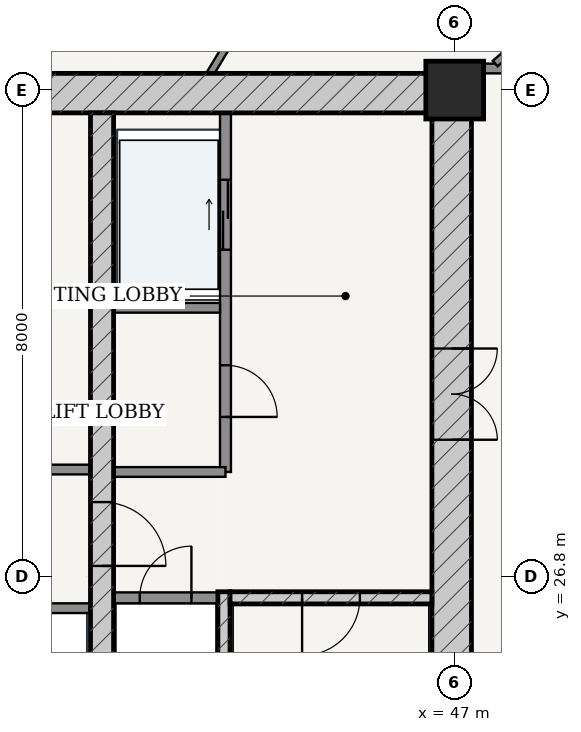
"""IFC4 building model, lengths in metres.
Left out: names, types, materials, properties, quantities, classifications, styles, units other than length and angle.
Written with IfcOpenShell. Run it as: python <this file> out.ifc"""

import sys

from ifc_helpers import new_model, si_unit, direction, frame, frame_2d, origin, origin_2d, place, context, subcontext, project, spatial, rectangle, extrude, source, transform, mapped, element, fill, save


model = new_model("IFC4")
c1 = context("Model", 3, precision=1e-05, world=origin(), true_north=direction((-0.2419218956, 0.970295726276)))
c2 = subcontext(c1, "Body", "Model", "MODEL_VIEW")
j1 = project(units=[si_unit("LENGTHUNIT", "METRE"), si_unit("PLANEANGLEUNIT", "RADIAN")], contexts=[c1])
p1 = place(None, origin())
s1 = spatial("IfcSite", under=j1, at=p1, CompositionType="ELEMENT")
p2 = place(p1, origin())
s2 = spatial("IfcBuilding", under=s1, at=p2, CompositionType="ELEMENT")
p3 = place(p2, frame((0.0, 0.0, 160.6)))
s3 = spatial("IfcBuildingStorey", under=s2, at=p3, CompositionType="ELEMENT", Elevation=160.6)
p4 = place(p3, frame((47.0, 34.8, 0.0), z_axis=(0.0, 0.0, 1.0), x_axis=(1.0, 0.0, 0.0)))
e1 = element("IfcColumn", 1, at=p4, inside=s3, PredefinedType="COLUMN", context=c2, shape_type="SweptSolid", body=[
    extrude(rectangle(XDim=0.95, YDim=0.95, at=origin_2d()), origin(), (0.0, 0.0, 1.0), 3.6),
])
p5 = place(p3, frame((28.725, 34.75, 0.0), z_axis=(0.0, 0.0, 1.0), x_axis=(1.0, 0.0, 0.0)))
e2 = element("IfcWall", 2, at=p5, inside=s3, PredefinedType="SHEAR", context=c2, shape_type="SweptSolid", body=[
    extrude(rectangle(XDim=18.55, YDim=0.65, at=frame_2d((9.275, 0.0))), origin(), (0.0, 0.0, 1.0), 3.33),
])
p6 = place(p3, frame((46.95, 19.175, 0.0), z_axis=(0.0, 0.0, 1.0), x_axis=(0.0, 1.0, 0.0)))
e3 = element("IfcWall", 3, at=p6, inside=s3, PredefinedType="SHEAR", context=c2, shape_type="SweptSolid", body=[
    extrude(rectangle(XDim=15.25, YDim=0.65, at=frame_2d((7.625, 0.0))), origin(), (0.0, 0.0, 1.0), 3.33),
])
p7 = place(p6, frame((9.875, 0.0, 0.0)))
e4 = element("IfcOpeningElement", 4, at=p7, cuts=e3, PredefinedType="OPENING", context=c2, shape_type="SweptSolid", body=[
    extrude(rectangle(XDim=1.5, YDim=2.2, at=frame_2d((0.75, 1.1))), frame((0.0, 0.335, 0.0), z_axis=(0.0, -1.0, 0.0), x_axis=(1.0, 0.0, 0.0)), (0.0, 0.0, 1.0), 0.67),
])
p8 = place(p3, frame((43.205, 19.175, 0.0), z_axis=(0.0, 0.0, 1.0), x_axis=(0.0, 1.0, 0.0)))
e5 = element("IfcWall", 5, at=p8, inside=s3, PredefinedType="SOLIDWALL", context=c2, shape_type="SweptSolid", body=[
    extrude(rectangle(XDim=7.375, YDim=0.2, at=frame_2d((3.688, 0.0))), origin(), (0.0, 0.0, 1.0), 3.33),
])
p9 = place(p3, frame((43.305, 26.45, 0.0), z_axis=(0.0, 0.0, 1.0), x_axis=(1.0, 0.0, 0.0)))
e6 = element("IfcWall", 6, at=p9, inside=s3, PredefinedType="SOLIDWALL", context=c2, shape_type="SweptSolid", body=[
    extrude(rectangle(XDim=3.32, YDim=0.2, at=frame_2d((1.66, 0.0))), origin(), (0.0, 0.0, 1.0), 3.33),
])
p10 = place(p9, frame((1.185, 0.0, 0.0)))
e7 = element("IfcOpeningElement", 7, at=p10, cuts=e6, PredefinedType="OPENING", context=c2, shape_type="SweptSolid", body=[
    extrude(rectangle(XDim=0.95, YDim=2.15, at=frame_2d((0.475, 1.075))), frame((0.0, 0.11, 0.0), z_axis=(0.0, -1.0, 0.0), x_axis=(1.0, 0.0, 0.0)), (0.0, 0.0, 1.0), 0.22),
])
p11 = place(p3, frame((41.2, 19.175, 0.0), z_axis=(0.0, 0.0, 1.0), x_axis=(0.0, 1.0, 0.0)))
e8 = element("IfcWall", 8, at=p11, inside=s3, PredefinedType="SHEAR", context=c2, shape_type="SweptSolid", body=[
    extrude(rectangle(XDim=15.25, YDim=0.38, at=frame_2d((7.625, 0.0))), origin(), (0.0, 0.0, 1.0), 3.33),
])
p12 = place(p11, frame((7.8, 0.0, 0.0)))
e9 = element("IfcOpeningElement", 9, at=p12, cuts=e8, PredefinedType="OPENING", context=c2, shape_type="SweptSolid", body=[
    extrude(rectangle(XDim=1.05, YDim=2.15, at=frame_2d((0.525, 1.075))), frame((0.0, 0.2, 0.0), z_axis=(0.0, -1.0, 0.0), x_axis=(1.0, 0.0, 0.0)), (0.0, 0.0, 1.0), 0.4),
])
p13 = place(p3, frame((41.39, 26.45, 0.0), z_axis=(0.0, 0.0, 1.0), x_axis=(1.0, 0.0, 0.0)))
e10 = element("IfcWall", 10, at=p13, inside=s3, PredefinedType="PARTITIONING", context=c2, shape_type="SweptSolid", body=[
    extrude(rectangle(XDim=1.71, YDim=0.18, at=frame_2d((0.855, 0.0))), origin(), (0.0, 0.0, 1.0), 3.33),
])
p14 = place(p13, frame((0.43, 0.0, 0.0)))
e11 = element("IfcOpeningElement", 11, at=p14, cuts=e10, PredefinedType="OPENING", context=c2, shape_type="SweptSolid", body=[
    extrude(rectangle(XDim=0.85, YDim=2.1, at=frame_2d((0.425, 1.05))), frame((0.0, 0.1, 0.0), z_axis=(0.0, -1.0, 0.0), x_axis=(1.0, 0.0, 0.0)), (0.0, 0.0, 1.0), 0.2),
])
p15 = place(p3, frame((43.23, 28.52, 0.0), z_axis=(0.0, 0.0, 1.0), x_axis=(0.0, 1.0, 0.0)))
e12 = element("IfcWall", 12, at=p15, inside=s3, PredefinedType="PARTITIONING", context=c2, shape_type="SweptSolid", body=[
    extrude(rectangle(XDim=5.905, YDim=0.18, at=frame_2d((2.953, 0.0))), origin(), (0.0, 0.0, 1.0), 3.33),
])
p16 = place(p15, frame((0.905, 0.0, 0.0)))
e13 = element("IfcOpeningElement", 13, at=p16, cuts=e12, PredefinedType="OPENING", context=c2, shape_type="SweptSolid", body=[
    extrude(rectangle(XDim=0.85, YDim=2.1, at=frame_2d((0.425, 1.05))), frame((0.0, 0.1, 0.0), z_axis=(0.0, -1.0, 0.0), x_axis=(1.0, 0.0, 0.0)), (0.0, 0.0, 1.0), 0.2),
])
p17 = place(p15, frame((3.655, 0.0, 0.0)))
e14 = element("IfcOpeningElement", 14, at=p17, cuts=e12, PredefinedType="OPENING", context=c2, shape_type="SweptSolid", body=[
    extrude(rectangle(XDim=1.15, YDim=2.2, at=frame_2d((0.575, 1.1))), frame((0.0, 0.1, 0.0), z_axis=(0.0, -1.0, 0.0), x_axis=(1.0, 0.0, 0.0)), (0.0, 0.0, 1.0), 0.2),
])
p18 = place(p3, frame((41.39, 31.22, 0.0), z_axis=(0.0, 0.0, 1.0), x_axis=(1.0, 0.0, 0.0)))
e15 = element("IfcWall", 15, at=p18, inside=s3, PredefinedType="PARTITIONING", context=c2, shape_type="SweptSolid", body=[
    extrude(rectangle(XDim=1.75, YDim=0.16, at=frame_2d((0.875, 0.0))), origin(), (0.0, 0.0, 1.0), 3.33),
])
p19 = place(p3, frame((41.39, 28.52, 0.0), z_axis=(0.0, 0.0, 1.0), x_axis=(1.0, 0.0, 0.0)))
e16 = element("IfcWall", 16, at=p19, inside=s3, PredefinedType="PARTITIONING", context=c2, shape_type="SweptSolid", body=[
    extrude(rectangle(XDim=1.84, YDim=0.16, at=frame_2d((0.92, 0.0))), origin(), (0.0, 0.0, 1.0), 3.33),
])
p20 = place(p3, frame((34.99, 28.56, 0.0), z_axis=(0.0, 0.0, 1.0), x_axis=(1.0, 0.0, 0.0)))
e17 = element("IfcWall", 17, at=p20, inside=s3, PredefinedType="PARTITIONING", context=c2, shape_type="SweptSolid", body=[
    extrude(rectangle(XDim=6.02, YDim=0.16, at=frame_2d((3.01, 0.0))), origin(), (0.0, 0.0, 1.0), 3.33),
])
p21 = place(p20, frame((2.585, 0.0, 0.0)))
e18 = element("IfcOpeningElement", 18, at=p21, cuts=e17, PredefinedType="OPENING", context=c2, shape_type="SweptSolid", body=[
    extrude(rectangle(XDim=0.85, YDim=2.1, at=frame_2d((0.425, 1.05))), frame((0.0, 0.09, 0.0), z_axis=(0.0, -1.0, 0.0), x_axis=(1.0, 0.0, 0.0)), (0.0, 0.0, 1.0), 0.18),
])
p22 = place(p3, frame((34.99, 26.28, 0.0), z_axis=(0.0, 0.0, 1.0), x_axis=(1.0, 0.0, 0.0)))
e19 = element("IfcWall", 19, at=p22, inside=s3, PredefinedType="PARTITIONING", context=c2, shape_type="SweptSolid", body=[
    extrude(rectangle(XDim=6.02, YDim=0.16, at=frame_2d((3.01, 0.0))), origin(), (0.0, 0.0, 1.0), 3.33),
])
p23 = place(p22, frame((0.225, 0.0, 0.0)))
e20 = element("IfcOpeningElement", 20, at=p23, cuts=e19, PredefinedType="OPENING", context=c2, shape_type="SweptSolid", body=[
    extrude(rectangle(XDim=1.1, YDim=2.2, at=frame_2d((0.55, 1.1))), frame((0.0, 0.09, 0.0), z_axis=(0.0, -1.0, 0.0), x_axis=(1.0, 0.0, 0.0)), (0.0, 0.0, 1.0), 0.18),
])
p24 = place(p22, frame((1.705, 0.0, 0.0)))
e21 = element("IfcOpeningElement", 21, at=p24, cuts=e19, PredefinedType="OPENING", context=c2, shape_type="SweptSolid", body=[
    extrude(rectangle(XDim=1.1, YDim=2.2, at=frame_2d((0.55, 1.1))), frame((0.0, 0.09, 0.0), z_axis=(0.0, -1.0, 0.0), x_axis=(1.0, 0.0, 0.0)), (0.0, 0.0, 1.0), 0.18),
])
p25 = place(p3, frame((47.275, 35.155, 0.0), z_axis=(0.0, 0.0, 1.0), x_axis=(1.0, 0.0, 0.0)))
e22 = element("IfcWall", 22, at=p25, inside=s3, PredefinedType="PARTITIONING", context=c2, shape_type="SweptSolid", body=[
    extrude(rectangle(XDim=1.93, YDim=0.16, at=frame_2d((0.965, 0.0))), origin(), (0.0, 0.0, 1.0), 2.776),
])
p26 = place(p3, frame((47.665, 35.236, 0.0), z_axis=(0.0, 0.0, 1.0), x_axis=(0.753384754287, 0.657579966246, 0.0)))
e23 = element("IfcWall", 23, at=p26, inside=s3, PredefinedType="PARTITIONING", context=c2, shape_type="SweptSolid", body=[
    extrude(rectangle(XDim=4.133, YDim=0.12, at=frame_2d((2.067, 0.0))), origin(), (0.0, 0.0, 1.0), 3.005),
])
p27 = place(p26, frame((1.617, 0.0, 0.0)))
e24 = element("IfcOpeningElement", 24, at=p27, cuts=e23, PredefinedType="OPENING", context=c2, shape_type="SweptSolid", body=[
    extrude(rectangle(XDim=0.9, YDim=2.15, at=frame_2d((0.45, 1.075))), frame((0.0, 0.07, 0.0), z_axis=(0.0, -1.0, 0.0), x_axis=(1.0, 0.0, 0.0)), (0.0, 0.0, 1.0), 0.14),
])
p28 = place(p3, frame((42.98, 35.075, 0.0), z_axis=(0.0, 0.0, 1.0), x_axis=(0.515686235332, 0.856777512946, 0.0)))
e25 = element("IfcWall", 25, at=p28, inside=s3, PredefinedType="PARTITIONING", context=c2, shape_type="SweptSolid", body=[
    extrude(rectangle(XDim=3.346, YDim=0.12, at=frame_2d((1.673, 0.0))), origin(), (0.0, 0.0, 1.0), 3.33),
])
m1 = source(origin(), c2, "Body", "SweptSolid", [
    extrude(rectangle(XDim=1.5, YDim=2.2, at=frame_2d((0.75, 1.1))), frame((0.0, 0.025, 0.0), z_axis=(0.0, -1.0, 0.0), x_axis=(1.0, 0.0, 0.0)), (0.0, 0.0, 1.0), 0.05),
])
p29 = place(p7, frame((1.5, 0.0, 0.0), z_axis=(0.0, 0.0, 1.0), x_axis=(-1.0, 0.0, 0.0)))
e26 = element("IfcDoor", 26, at=p29, inside=s3, OperationType="DOUBLE_DOOR_SINGLE_SWING", PredefinedType="DOOR", context=c2, shape_type="MappedRepresentation", body=[
    mapped(m1, transform((0.0, 0.0, 0.0), scale=1.0)),
])
fill(e4, e26)
m2 = source(origin(), c2, "Body", "SweptSolid", [
    extrude(rectangle(XDim=1.05, YDim=2.15, at=frame_2d((0.525, 1.075))), frame((0.0, 0.025, 0.0), z_axis=(0.0, -1.0, 0.0), x_axis=(1.0, 0.0, 0.0)), (0.0, 0.0, 1.0), 0.05),
])
p30 = place(p12, frame((1.05, 0.0, 0.0), z_axis=(0.0, 0.0, 1.0), x_axis=(-1.0, 0.0, 0.0)))
e27 = element("IfcDoor", 27, at=p30, inside=s3, OperationType="SINGLE_SWING_RIGHT", PredefinedType="DOOR", context=c2, shape_type="MappedRepresentation", body=[
    mapped(m2, transform((0.0, 0.0, 0.0), scale=1.0)),
])
fill(e9, e27)
m3 = source(origin(), c2, "Body", "SweptSolid", [
    extrude(rectangle(XDim=0.95, YDim=2.15, at=frame_2d((0.475, 1.075))), frame((0.0, 0.025, 0.0), z_axis=(0.0, -1.0, 0.0), x_axis=(1.0, 0.0, 0.0)), (0.0, 0.0, 1.0), 0.05),
])
p31 = place(p10, frame((0.95, 0.0, 0.0), z_axis=(0.0, 0.0, 1.0), x_axis=(-1.0, 0.0, 0.0)))
e28 = element("IfcDoor", 28, at=p31, inside=s3, OperationType="SINGLE_SWING_RIGHT", PredefinedType="DOOR", context=c2, shape_type="MappedRepresentation", body=[
    mapped(m3, transform((0.0, 0.0, 0.0), scale=1.0)),
])
fill(e7, e28)
m4 = source(origin(), c2, "Body", "SweptSolid", [
    extrude(rectangle(XDim=0.85, YDim=2.1, at=frame_2d((0.425, 1.05))), frame((0.0, 0.025, 0.0), z_axis=(0.0, -1.0, 0.0), x_axis=(1.0, 0.0, 0.0)), (0.0, 0.0, 1.0), 0.05),
])
p32 = place(p14, origin())
e29 = element("IfcDoor", 29, at=p32, inside=s3, OperationType="SINGLE_SWING_RIGHT", PredefinedType="DOOR", context=c2, shape_type="MappedRepresentation", body=[
    mapped(m4, transform((0.0, 0.0, 0.0), scale=1.0)),
])
fill(e11, e29)
p33 = place(p16, frame((0.85, 0.0, 0.0), z_axis=(0.0, 0.0, 1.0), x_axis=(-1.0, 0.0, 0.0)))
e30 = element("IfcDoor", 30, at=p33, inside=s3, OperationType="SINGLE_SWING_RIGHT", PredefinedType="DOOR", context=c2, shape_type="MappedRepresentation", body=[
    mapped(m4, transform((0.0, 0.0, 0.0), scale=1.0)),
])
fill(e13, e30)
m5 = source(origin(), c2, "Body", "SweptSolid", [
    extrude(rectangle(XDim=1.15, YDim=2.2, at=frame_2d((0.575, 1.1))), frame((0.0, 0.025, 0.0), z_axis=(0.0, -1.0, 0.0), x_axis=(1.0, 0.0, 0.0)), (0.0, 0.0, 1.0), 0.05),
])
p34 = place(p17, origin())
e31 = element("IfcDoor", 31, at=p34, inside=s3, OperationType="DOUBLE_DOOR_SLIDING", PredefinedType="DOOR", context=c2, shape_type="MappedRepresentation", body=[
    mapped(m5, transform((0.0, 0.0, 0.0), scale=1.0)),
])
fill(e14, e31)
save(model, sys.argv[1])
